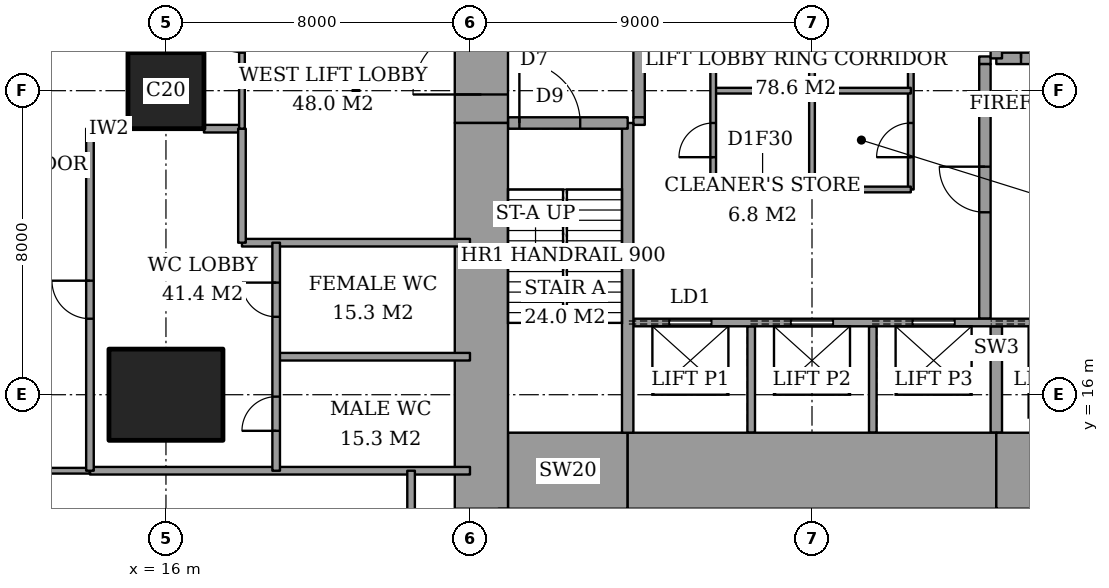
"""IFC4 building model, lengths in metres.
Left out: names, types, materials, properties, quantities, classifications, styles, units other than length and angle.
Written with IfcOpenShell. Run it as: python <this file> out.ifc"""

import sys

from ifc_helpers import new_model, si_unit, direction, frame, frame_2d, origin, origin_2d, place, context, subcontext, project, spatial, rectangle, extrude, element, fill, save


model = new_model("IFC4")
c1 = context("Model", 3, precision=1e-05, world=origin(), true_north=direction((0.0, 1.0)))
c2 = subcontext(c1, "Body", "Model", "MODEL_VIEW")
j1 = project(units=[si_unit("LENGTHUNIT", "METRE"), si_unit("PLANEANGLEUNIT", "RADIAN")], contexts=[c1])
p1 = place(None, origin())
s1 = spatial("IfcSite", under=j1, at=p1, CompositionType="ELEMENT")
p2 = place(p1, origin())
s2 = spatial("IfcBuilding", under=s1, at=p2, CompositionType="ELEMENT")
p3 = place(p2, frame((0.0, 0.0, 21.0)))
s3 = spatial("IfcBuildingStorey", under=s2, at=p3, CompositionType="ELEMENT", Elevation=21.0)
p4 = place(p3, frame((16.0, 16.0, 0.0), z_axis=(0.0, 0.0, 1.0), x_axis=(1.0, 0.0, 0.0)))
e1 = element("IfcColumn", 1, at=p4, inside=s3, PredefinedType="COLUMN", context=c2, shape_type="SweptSolid", body=[
    extrude(rectangle(XDim=3.0, YDim=2.4, at=origin_2d()), origin(), (0.0, 0.0, 1.0), 5.0),
])
p5 = place(p3, frame((16.0, 24.0, 0.0), z_axis=(0.0, 0.0, 1.0), x_axis=(1.0, 0.0, 0.0)))
e2 = element("IfcColumn", 2, at=p5, inside=s3, PredefinedType="COLUMN", context=c2, shape_type="SweptSolid", body=[
    extrude(rectangle(XDim=2.0, YDim=2.0, at=origin_2d()), origin(), (0.0, 0.0, 1.0), 5.0),
])
p6 = place(p3, frame((25.0, 14.0, 0.0), z_axis=(0.0, 0.0, 1.0), x_axis=(1.0, 0.0, 0.0)))
e3 = element("IfcWall", 3, at=p6, inside=s3, PredefinedType="SHEAR", context=c2, shape_type="SweptSolid", body=[
    extrude(rectangle(XDim=3.15, YDim=2.0, at=frame_2d((1.575, 0.0))), origin(), (0.0, 0.0, 1.0), 5.0),
])
p7 = place(p3, frame((28.15, 14.0, 0.0), z_axis=(0.0, 0.0, 1.0), x_axis=(1.0, 0.0, 0.0)))
e4 = element("IfcWall", 4, at=p7, inside=s3, PredefinedType="SHEAR", context=c2, shape_type="SweptSolid", body=[
    extrude(rectangle(XDim=9.7, YDim=2.0, at=frame_2d((4.85, 0.0))), origin(), (0.0, 0.0, 1.0), 5.0),
])
p8 = place(p3, frame((37.85, 14.0, 0.0), z_axis=(0.0, 0.0, 1.0), x_axis=(1.0, 0.0, 0.0)))
e5 = element("IfcWall", 5, at=p8, inside=s3, PredefinedType="SHEAR", context=c2, shape_type="SweptSolid", body=[
    extrude(rectangle(XDim=3.15, YDim=2.0, at=frame_2d((1.575, 0.0))), origin(), (0.0, 0.0, 1.0), 5.0),
])
p9 = place(p3, frame((24.3, 13.0, 0.0), z_axis=(0.0, 0.0, 1.0), x_axis=(0.0, 1.0, 0.0)))
e6 = element("IfcWall", 6, at=p9, inside=s3, PredefinedType="SHEAR", context=c2, shape_type="SweptSolid", body=[
    extrude(rectangle(XDim=10.15, YDim=1.4, at=frame_2d((5.075, 0.0))), origin(), (0.0, 0.0, 1.0), 5.0),
])
p10 = place(p3, frame((24.3, 23.15, 0.0), z_axis=(0.0, 0.0, 1.0), x_axis=(0.0, 1.0, 0.0)))
e7 = element("IfcWall", 7, at=p10, inside=s3, PredefinedType="SHEAR", context=c2, shape_type="SweptSolid", body=[
    extrude(rectangle(XDim=11.85, YDim=1.4, at=frame_2d((5.925, 0.0))), origin(), (0.0, 0.0, 1.0), 5.0),
])
p11 = place(p10, frame((0.75, 0.0, 0.0)))
e8 = element("IfcOpeningElement", 8, at=p11, cuts=e7, PredefinedType="OPENING", context=c2, shape_type="SweptSolid", body=[
    extrude(rectangle(XDim=1.8, YDim=2.4, at=frame_2d((0.9, 1.2))), frame((0.0, 0.71, 0.0), z_axis=(0.0, -1.0, 0.0), x_axis=(1.0, 0.0, 0.0)), (0.0, 0.0, 1.0), 1.42),
])
p12 = place(p3, frame((28.15, 15.0, 0.0), z_axis=(0.0, 0.0, 1.0), x_axis=(0.0, 1.0, 0.0)))
e9 = element("IfcWall", 9, at=p12, inside=s3, PredefinedType="SHEAR", context=c2, shape_type="SweptSolid", body=[
    extrude(rectangle(XDim=8.15, YDim=0.3, at=frame_2d((4.075, 0.0))), origin(), (0.0, 0.0, 1.0), 5.0),
])
p13 = place(p3, frame((25.0, 23.15, 0.0), z_axis=(0.0, 0.0, 1.0), x_axis=(1.0, 0.0, 0.0)))
e10 = element("IfcWall", 10, at=p13, inside=s3, PredefinedType="SHEAR", context=c2, shape_type="SweptSolid", body=[
    extrude(rectangle(XDim=3.15, YDim=0.3, at=frame_2d((1.575, 0.0))), origin(), (0.0, 0.0, 1.0), 5.0),
])
p14 = place(p13, frame((0.3, 0.0, 0.0)))
e11 = element("IfcOpeningElement", 11, at=p14, cuts=e10, PredefinedType="OPENING", context=c2, shape_type="SweptSolid", body=[
    extrude(rectangle(XDim=1.6, YDim=2.1, at=frame_2d((0.8, 1.05))), frame((0.0, 0.16, 0.0), z_axis=(0.0, -1.0, 0.0), x_axis=(1.0, 0.0, 0.0)), (0.0, 0.0, 1.0), 0.32),
])
p15 = place(p3, frame((37.85, 24.85, 0.0), z_axis=(0.0, 0.0, 1.0), x_axis=(0.0, 1.0, 0.0)))
e12 = element("IfcWall", 12, at=p15, inside=s3, PredefinedType="SHEAR", context=c2, shape_type="SweptSolid", body=[
    extrude(rectangle(XDim=8.15, YDim=0.3, at=frame_2d((4.075, 0.0))), origin(), (0.0, 0.0, 1.0), 5.0),
])
p16 = place(p3, frame((37.85, 24.85, 0.0), z_axis=(0.0, 0.0, 1.0), x_axis=(1.0, 0.0, 0.0)))
e13 = element("IfcWall", 13, at=p16, inside=s3, PredefinedType="SHEAR", context=c2, shape_type="SweptSolid", body=[
    extrude(rectangle(XDim=3.15, YDim=0.3, at=frame_2d((1.575, 0.0))), origin(), (0.0, 0.0, 1.0), 5.0),
])
p17 = place(p16, frame((0.65, 0.0, 0.0)))
e14 = element("IfcOpeningElement", 14, at=p17, cuts=e13, PredefinedType="OPENING", context=c2, shape_type="SweptSolid", body=[
    extrude(rectangle(XDim=1.6, YDim=2.1, at=frame_2d((0.8, 1.05))), frame((0.0, 0.16, 0.0), z_axis=(0.0, -1.0, 0.0), x_axis=(1.0, 0.0, 0.0)), (0.0, 0.0, 1.0), 0.32),
])
p18 = place(p3, frame((28.45, 23.3, 0.0), z_axis=(0.0, 0.0, 1.0), x_axis=(0.0, 1.0, 0.0)))
e15 = element("IfcWall", 15, at=p18, inside=s3, PredefinedType="PARTITIONING", context=c2, shape_type="SweptSolid", body=[
    extrude(rectangle(XDim=6.7, YDim=0.3, at=frame_2d((3.35, 0.0))), origin(), (0.0, 0.0, 1.0), 5.0),
])
p19 = place(p18, frame((2.7, 0.0, 0.0)))
e16 = element("IfcOpeningElement", 16, at=p19, cuts=e15, PredefinedType="OPENING", context=c2, shape_type="SweptSolid", body=[
    extrude(rectangle(XDim=1.2, YDim=2.1, at=frame_2d((0.6, 1.05))), frame((0.0, 0.16, 0.0), z_axis=(0.0, -1.0, 0.0), x_axis=(1.0, 0.0, 0.0)), (0.0, 0.0, 1.0), 0.32),
])
p20 = place(p3, frame((37.55, 18.0, 0.0), z_axis=(0.0, 0.0, 1.0), x_axis=(0.0, 1.0, 0.0)))
e17 = element("IfcWall", 17, at=p20, inside=s3, PredefinedType="PARTITIONING", context=c2, shape_type="SweptSolid", body=[
    extrude(rectangle(XDim=6.7, YDim=0.3, at=frame_2d((3.35, 0.0))), origin(), (0.0, 0.0, 1.0), 5.0),
])
p21 = place(p20, frame((2.8, 0.0, 0.0)))
e18 = element("IfcOpeningElement", 18, at=p21, cuts=e17, PredefinedType="OPENING", context=c2, shape_type="SweptSolid", body=[
    extrude(rectangle(XDim=1.2, YDim=2.1, at=frame_2d((0.6, 1.05))), frame((0.0, 0.16, 0.0), z_axis=(0.0, -1.0, 0.0), x_axis=(1.0, 0.0, 0.0)), (0.0, 0.0, 1.0), 0.32),
])
p22 = place(p3, frame((14.0, 14.0, 0.0), z_axis=(0.0, 0.0, 1.0), x_axis=(1.0, 0.0, 0.0)))
e19 = element("IfcWall", 19, at=p22, inside=s3, PredefinedType="PARTITIONING", context=c2, shape_type="SweptSolid", body=[
    extrude(rectangle(XDim=10.0, YDim=0.2, at=frame_2d((5.0, 0.0))), origin(), (0.0, 0.0, 1.0), 4.65),
])
p23 = place(p3, frame((9.5, 14.0, 0.0), z_axis=(0.0, 0.0, 1.0), x_axis=(1.0, 0.0, 0.0)))
e20 = element("IfcWall", 20, at=p23, inside=s3, PredefinedType="PARTITIONING", context=c2, shape_type="SweptSolid", body=[
    extrude(rectangle(XDim=4.5, YDim=0.15, at=frame_2d((2.25, 0.0))), origin(), (0.0, 0.0, 1.0), 4.65),
])
p24 = place(p23, frame((1.35, 0.0, 0.0)))
e21 = element("IfcOpeningElement", 21, at=p24, cuts=e20, PredefinedType="OPENING", context=c2, shape_type="SweptSolid", body=[
    extrude(rectangle(XDim=1.8, YDim=2.1, at=frame_2d((0.9, 1.05))), frame((0.0, 0.085, 0.0), z_axis=(0.0, -1.0, 0.0), x_axis=(1.0, 0.0, 0.0)), (0.0, 0.0, 1.0), 0.17),
])
p25 = place(p3, frame((18.9, 17.0, 0.0), z_axis=(0.0, 0.0, 1.0), x_axis=(1.0, 0.0, 0.0)))
e22 = element("IfcWall", 22, at=p25, inside=s3, PredefinedType="PARTITIONING", context=c2, shape_type="SweptSolid", body=[
    extrude(rectangle(XDim=5.1, YDim=0.2, at=frame_2d((2.55, 0.0))), origin(), (0.0, 0.0, 1.0), 4.65),
])
p26 = place(p3, frame((18.0, 20.0, 0.0), z_axis=(0.0, 0.0, 1.0), x_axis=(1.0, 0.0, 0.0)))
e23 = element("IfcWall", 23, at=p26, inside=s3, PredefinedType="PARTITIONING", context=c2, shape_type="SweptSolid", body=[
    extrude(rectangle(XDim=6.0, YDim=0.2, at=frame_2d((3.0, 0.0))), origin(), (0.0, 0.0, 1.0), 4.65),
])
for number, where, z_axis, x_axis in (
    (24, (14.0, 23.0, 0.0), (0.0, 0.0, 1.0), (1.0, 0.0, 0.0)),
    (25, (17.0, 23.0, 0.0), (0.0, 0.0, 1.0), (1.0, 0.0, 0.0)),
):
    element("IfcWall", number, at=place(p3, frame(where, z_axis=z_axis, x_axis=x_axis)), inside=s3, PredefinedType="PARTITIONING", context=c2, shape_type="SweptSolid", body=[
        extrude(rectangle(XDim=1.0, YDim=0.2, at=frame_2d((0.5, 0.0))), origin(), (0.0, 0.0, 1.0), 4.65),
    ])
p27 = place(p3, frame((14.0, 14.0, 0.0), z_axis=(0.0, 0.0, 1.0), x_axis=(0.0, 1.0, 0.0)))
e26 = element("IfcWall", 26, at=p27, inside=s3, PredefinedType="PARTITIONING", context=c2, shape_type="SweptSolid", body=[
    extrude(rectangle(XDim=9.0, YDim=0.2, at=frame_2d((4.5, 0.0))), origin(), (0.0, 0.0, 1.0), 4.65),
])
p28 = place(p27, frame((4.0, 0.0, 0.0)))
e27 = element("IfcOpeningElement", 27, at=p28, cuts=e26, PredefinedType="OPENING", context=c2, shape_type="SweptSolid", body=[
    extrude(rectangle(XDim=1.0, YDim=2.1, at=frame_2d((0.5, 1.05))), frame((0.0, 0.11, 0.0), z_axis=(0.0, -1.0, 0.0), x_axis=(1.0, 0.0, 0.0)), (0.0, 0.0, 1.0), 0.22),
])
p29 = place(p3, frame((18.0, 20.0, 0.0), z_axis=(0.0, 0.0, 1.0), x_axis=(0.0, 1.0, 0.0)))
e28 = element("IfcWall", 28, at=p29, inside=s3, PredefinedType="PARTITIONING", context=c2, shape_type="SweptSolid", body=[
    extrude(rectangle(XDim=3.0, YDim=0.2, at=frame_2d((1.5, 0.0))), origin(), (0.0, 0.0, 1.0), 4.65),
])
p30 = place(p3, frame((18.0, 23.0, 0.0), z_axis=(0.0, 0.0, 1.0), x_axis=(0.0, 1.0, 0.0)))
e29 = element("IfcWall", 29, at=p30, inside=s3, PredefinedType="PARTITIONING", context=c2, shape_type="SweptSolid", body=[
    extrude(rectangle(XDim=5.0, YDim=0.15, at=frame_2d((2.5, 0.0))), origin(), (0.0, 0.0, 1.0), 4.65),
])
p31 = place(p30, frame((2.0, 0.0, 0.0)))
e30 = element("IfcOpeningElement", 30, at=p31, cuts=e29, PredefinedType="OPENING", context=c2, shape_type="SweptSolid", body=[
    extrude(rectangle(XDim=1.0, YDim=2.1, at=frame_2d((0.5, 1.05))), frame((0.0, 0.085, 0.0), z_axis=(0.0, -1.0, 0.0), x_axis=(1.0, 0.0, 0.0)), (0.0, 0.0, 1.0), 0.17),
])
p32 = place(p3, frame((18.9, 14.0, 0.0), z_axis=(0.0, 0.0, 1.0), x_axis=(0.0, 1.0, 0.0)))
e31 = element("IfcWall", 31, at=p32, inside=s3, PredefinedType="PARTITIONING", context=c2, shape_type="SweptSolid", body=[
    extrude(rectangle(XDim=6.0, YDim=0.2, at=frame_2d((3.0, 0.0))), origin(), (0.0, 0.0, 1.0), 4.65),
])
p33 = place(p32, frame((1.05, 0.0, 0.0)))
e32 = element("IfcOpeningElement", 32, at=p33, cuts=e31, PredefinedType="OPENING", context=c2, shape_type="SweptSolid", body=[
    extrude(rectangle(XDim=0.9, YDim=2.1, at=frame_2d((0.45, 1.05))), frame((0.0, 0.11, 0.0), z_axis=(0.0, -1.0, 0.0), x_axis=(1.0, 0.0, 0.0)), (0.0, 0.0, 1.0), 0.22),
])
p34 = place(p32, frame((4.05, 0.0, 0.0)))
e33 = element("IfcOpeningElement", 33, at=p34, cuts=e31, PredefinedType="OPENING", context=c2, shape_type="SweptSolid", body=[
    extrude(rectangle(XDim=0.9, YDim=2.1, at=frame_2d((0.45, 1.05))), frame((0.0, 0.11, 0.0), z_axis=(0.0, -1.0, 0.0), x_axis=(1.0, 0.0, 0.0)), (0.0, 0.0, 1.0), 0.22),
])
p35 = place(p3, frame((22.45, -0.45, 0.0), z_axis=(0.0, 0.0, 1.0), x_axis=(0.0, 1.0, 0.0)))
e34 = element("IfcWall", 34, at=p35, inside=s3, PredefinedType="PARTITIONING", context=c2, shape_type="SweptSolid", body=[
    extrude(rectangle(XDim=14.45, YDim=0.2, at=frame_2d((7.225, 0.0))), origin(), (0.0, 0.0, 1.0), 4.65),
])
p36 = place(p3, frame((24.85, -0.45, 0.0), z_axis=(0.0, 0.0, 1.0), x_axis=(0.0, 1.0, 0.0)))
e35 = element("IfcWall", 35, at=p36, inside=s3, PredefinedType="PARTITIONING", context=c2, shape_type="SweptSolid", body=[
    extrude(rectangle(XDim=13.45, YDim=0.2, at=frame_2d((6.725, 0.0))), origin(), (0.0, 0.0, 1.0), 4.65),
])
p37 = place(p3, frame((28.3, 17.9, 0.0), z_axis=(0.0, 0.0, 1.0), x_axis=(1.0, 0.0, 0.0)))
e36 = element("IfcWall", 36, at=p37, inside=s3, PredefinedType="PARTITIONING", context=c2, shape_type="SweptSolid", body=[
    extrude(rectangle(XDim=12.7, YDim=0.2, at=frame_2d((6.35, 0.0))), origin(), (0.0, 0.0, 1.0), 5.0),
])
p38 = place(p37, frame((0.95, 0.0, 0.0)))
e37 = element("IfcOpeningElement", 37, at=p38, cuts=e36, PredefinedType="OPENING", context=c2, shape_type="SweptSolid", body=[
    extrude(rectangle(XDim=1.1, YDim=2.1, at=frame_2d((0.55, 1.05))), frame((0.0, 0.11, 0.0), z_axis=(0.0, -1.0, 0.0), x_axis=(1.0, 0.0, 0.0)), (0.0, 0.0, 1.0), 0.22),
])
p39 = place(p37, frame((4.15, 0.0, 0.0)))
e38 = element("IfcOpeningElement", 38, at=p39, cuts=e36, PredefinedType="OPENING", context=c2, shape_type="SweptSolid", body=[
    extrude(rectangle(XDim=1.1, YDim=2.1, at=frame_2d((0.55, 1.05))), frame((0.0, 0.11, 0.0), z_axis=(0.0, -1.0, 0.0), x_axis=(1.0, 0.0, 0.0)), (0.0, 0.0, 1.0), 0.22),
])
p40 = place(p37, frame((7.35, 0.0, 0.0)))
e39 = element("IfcOpeningElement", 39, at=p40, cuts=e36, PredefinedType="OPENING", context=c2, shape_type="SweptSolid", body=[
    extrude(rectangle(XDim=1.1, YDim=2.1, at=frame_2d((0.55, 1.05))), frame((0.0, 0.11, 0.0), z_axis=(0.0, -1.0, 0.0), x_axis=(1.0, 0.0, 0.0)), (0.0, 0.0, 1.0), 0.22),
])
p41 = place(p37, frame((10.6, 0.0, 0.0)))
e40 = element("IfcOpeningElement", 40, at=p41, cuts=e36, PredefinedType="OPENING", context=c2, shape_type="SweptSolid", body=[
    extrude(rectangle(XDim=1.2, YDim=2.1, at=frame_2d((0.6, 1.05))), frame((0.0, 0.11, 0.0), z_axis=(0.0, -1.0, 0.0), x_axis=(1.0, 0.0, 0.0)), (0.0, 0.0, 1.0), 0.22),
])
for number, where, z_axis, x_axis in (
    (41, (31.4, 15.0, 0.0), (0.0, 0.0, 1.0), (0.0, 1.0, 0.0)),
    (42, (34.6, 15.0, 0.0), (0.0, 0.0, 1.0), (0.0, 1.0, 0.0)),
):
    element("IfcWall", number, at=place(p3, frame(where, z_axis=z_axis, x_axis=x_axis)), inside=s3, PredefinedType="PARTITIONING", context=c2, shape_type="SweptSolid", body=[
        extrude(rectangle(XDim=2.8, YDim=0.2, at=frame_2d((1.4, 0.0))), origin(), (0.0, 0.0, 1.0), 5.0),
    ])
p42 = place(p3, frame((37.85, 15.0, 0.0), z_axis=(0.0, 0.0, 1.0), x_axis=(0.0, 1.0, 0.0)))
e43 = element("IfcWall", 43, at=p42, inside=s3, PredefinedType="SHEAR", context=c2, shape_type="SweptSolid", body=[
    extrude(rectangle(XDim=2.8, YDim=0.3, at=frame_2d((1.4, 0.0))), origin(), (0.0, 0.0, 1.0), 5.0),
])
for number, where, z_axis, x_axis in (
    (44, (28.3, 23.2, 0.0), (0.0, 0.0, 1.0), (1.0, 0.0, 0.0)),
    (45, (37.4, 24.8, 0.0), (0.0, 0.0, 1.0), (1.0, 0.0, 0.0)),
):
    element("IfcWall", number, at=place(p3, frame(where, z_axis=z_axis, x_axis=x_axis)), inside=s3, PredefinedType="PARTITIONING", context=c2, shape_type="SweptSolid", body=[
        extrude(rectangle(XDim=0.3, YDim=0.2, at=frame_2d((0.15, 0.0))), origin(), (0.0, 0.0, 1.0), 5.0),
    ])
p43 = place(p3, frame((30.4, 21.4, 0.0), z_axis=(0.0, 0.0, 1.0), x_axis=(1.0, 0.0, 0.0)))
e46 = element("IfcWall", 46, at=p43, inside=s3, PredefinedType="PARTITIONING", context=c2, shape_type="SweptSolid", body=[
    extrude(rectangle(XDim=5.2, YDim=0.15, at=frame_2d((2.6, 0.0))), origin(), (0.0, 0.0, 1.0), 4.65),
])
p44 = place(p3, frame((30.4, 21.4, 0.0), z_axis=(0.0, 0.0, 1.0), x_axis=(0.0, 1.0, 0.0)))
e47 = element("IfcWall", 47, at=p44, inside=s3, PredefinedType="PARTITIONING", context=c2, shape_type="SweptSolid", body=[
    extrude(rectangle(XDim=5.2, YDim=0.15, at=frame_2d((2.6, 0.0))), origin(), (0.0, 0.0, 1.0), 4.65),
])
p45 = place(p44, frame((0.85, 0.0, 0.0)))
e48 = element("IfcOpeningElement", 48, at=p45, cuts=e47, PredefinedType="OPENING", context=c2, shape_type="SweptSolid", body=[
    extrude(rectangle(XDim=0.9, YDim=2.1, at=frame_2d((0.45, 1.05))), frame((0.0, 0.085, 0.0), z_axis=(0.0, -1.0, 0.0), x_axis=(1.0, 0.0, 0.0)), (0.0, 0.0, 1.0), 0.17),
])
p46 = place(p3, frame((35.6, 21.4, 0.0), z_axis=(0.0, 0.0, 1.0), x_axis=(0.0, 1.0, 0.0)))
e49 = element("IfcWall", 49, at=p46, inside=s3, PredefinedType="PARTITIONING", context=c2, shape_type="SweptSolid", body=[
    extrude(rectangle(XDim=5.2, YDim=0.15, at=frame_2d((2.6, 0.0))), origin(), (0.0, 0.0, 1.0), 4.65),
])
p47 = place(p46, frame((0.85, 0.0, 0.0)))
e50 = element("IfcOpeningElement", 50, at=p47, cuts=e49, PredefinedType="OPENING", context=c2, shape_type="SweptSolid", body=[
    extrude(rectangle(XDim=0.9, YDim=2.1, at=frame_2d((0.45, 1.05))), frame((0.0, 0.085, 0.0), z_axis=(0.0, -1.0, 0.0), x_axis=(1.0, 0.0, 0.0)), (0.0, 0.0, 1.0), 0.17),
])
for number, where, z_axis, x_axis in (
    (51, (30.4, 24.0, 0.0), (0.0, 0.0, 1.0), (1.0, 0.0, 0.0)),
    (52, (33.0, 21.4, 0.0), (0.0, 0.0, 1.0), (0.0, 1.0, 0.0)),
):
    element("IfcWall", number, at=place(p3, frame(where, z_axis=z_axis, x_axis=x_axis)), inside=s3, PredefinedType="PARTITIONING", context=c2, shape_type="SweptSolid", body=[
        extrude(rectangle(XDim=5.2, YDim=0.15, at=frame_2d((2.6, 0.0))), origin(), (0.0, 0.0, 1.0), 4.65),
    ])
p48 = place(p28, origin())
e53 = element("IfcDoor", 53, at=p48, inside=s3, OperationType="SINGLE_SWING_LEFT", PredefinedType="DOOR", context=c2, shape_type="SweptSolid", body=[
    extrude(rectangle(XDim=1.0, YDim=2.1, at=frame_2d((0.5, 1.05))), frame((0.0, 0.025, 0.0), z_axis=(0.0, -1.0, 0.0), x_axis=(1.0, 0.0, 0.0)), (0.0, 0.0, 1.0), 0.05),
])
fill(e27, e53)
p49 = place(p33, origin())
e54 = element("IfcDoor", 54, at=p49, inside=s3, OperationType="SINGLE_SWING_RIGHT", PredefinedType="DOOR", context=c2, shape_type="SweptSolid", body=[
    extrude(rectangle(XDim=0.9, YDim=2.1, at=frame_2d((0.45, 1.05))), frame((0.0, 0.025, 0.0), z_axis=(0.0, -1.0, 0.0), x_axis=(1.0, 0.0, 0.0)), (0.0, 0.0, 1.0), 0.05),
])
fill(e32, e54)
p50 = place(p34, origin())
e55 = element("IfcDoor", 55, at=p50, inside=s3, OperationType="SINGLE_SWING_LEFT", PredefinedType="DOOR", context=c2, shape_type="SweptSolid", body=[
    extrude(rectangle(XDim=0.9, YDim=2.1, at=frame_2d((0.45, 1.05))), frame((0.0, 0.025, 0.0), z_axis=(0.0, -1.0, 0.0), x_axis=(1.0, 0.0, 0.0)), (0.0, 0.0, 1.0), 0.05),
])
fill(e33, e55)
p51 = place(p14, origin())
e56 = element("IfcDoor", 56, at=p51, inside=s3, OperationType="DOUBLE_DOOR_SINGLE_SWING", PredefinedType="DOOR", context=c2, shape_type="SweptSolid", body=[
    extrude(rectangle(XDim=1.6, YDim=2.1, at=frame_2d((0.8, 1.05))), frame((0.0, 0.025, 0.0), z_axis=(0.0, -1.0, 0.0), x_axis=(1.0, 0.0, 0.0)), (0.0, 0.0, 1.0), 0.05),
])
fill(e11, e56)
p52 = place(p17, origin())
e57 = element("IfcDoor", 57, at=p52, inside=s3, OperationType="DOUBLE_DOOR_SINGLE_SWING", PredefinedType="DOOR", context=c2, shape_type="SweptSolid", body=[
    extrude(rectangle(XDim=1.6, YDim=2.1, at=frame_2d((0.8, 1.05))), frame((0.0, 0.025, 0.0), z_axis=(0.0, -1.0, 0.0), x_axis=(1.0, 0.0, 0.0)), (0.0, 0.0, 1.0), 0.05),
])
fill(e14, e57)
p53 = place(p21, origin())
e58 = element("IfcDoor", 58, at=p53, inside=s3, OperationType="SINGLE_SWING_LEFT", PredefinedType="DOOR", context=c2, shape_type="SweptSolid", body=[
    extrude(rectangle(XDim=1.2, YDim=2.1, at=frame_2d((0.6, 1.05))), frame((0.0, 0.025, 0.0), z_axis=(0.0, -1.0, 0.0), x_axis=(1.0, 0.0, 0.0)), (0.0, 0.0, 1.0), 0.05),
])
fill(e18, e58)
p54 = place(p11, origin())
e59 = element("IfcDoor", 59, at=p54, inside=s3, OperationType="DOUBLE_DOOR_DOUBLE_SWING", PredefinedType="DOOR", context=c2, shape_type="SweptSolid", body=[
    extrude(rectangle(XDim=1.8, YDim=2.4, at=frame_2d((0.9, 1.2))), frame((0.0, 0.025, 0.0), z_axis=(0.0, -1.0, 0.0), x_axis=(1.0, 0.0, 0.0)), (0.0, 0.0, 1.0), 0.05),
])
fill(e8, e59)
p55 = place(p45, origin())
e60 = element("IfcDoor", 60, at=p55, inside=s3, OperationType="SINGLE_SWING_RIGHT", PredefinedType="DOOR", context=c2, shape_type="SweptSolid", body=[
    extrude(rectangle(XDim=0.9, YDim=2.1, at=frame_2d((0.45, 1.05))), frame((0.0, 0.025, 0.0), z_axis=(0.0, -1.0, 0.0), x_axis=(1.0, 0.0, 0.0)), (0.0, 0.0, 1.0), 0.05),
])
fill(e48, e60)
p56 = place(p47, origin())
e61 = element("IfcDoor", 61, at=p56, inside=s3, OperationType="SINGLE_SWING_RIGHT", PredefinedType="DOOR", context=c2, shape_type="SweptSolid", body=[
    extrude(rectangle(XDim=0.9, YDim=2.1, at=frame_2d((0.45, 1.05))), frame((0.0, 0.025, 0.0), z_axis=(0.0, -1.0, 0.0), x_axis=(1.0, 0.0, 0.0)), (0.0, 0.0, 1.0), 0.05),
])
fill(e50, e61)
p57 = place(p38, origin())
e62 = element("IfcDoor", 62, at=p57, inside=s3, OperationType="SLIDING_TO_LEFT", PredefinedType="DOOR", context=c2, shape_type="SweptSolid", body=[
    extrude(rectangle(XDim=1.1, YDim=2.1, at=frame_2d((0.55, 1.05))), frame((0.0, 0.025, 0.0), z_axis=(0.0, -1.0, 0.0), x_axis=(1.0, 0.0, 0.0)), (0.0, 0.0, 1.0), 0.05),
])
fill(e37, e62)
p58 = place(p39, origin())
e63 = element("IfcDoor", 63, at=p58, inside=s3, OperationType="SLIDING_TO_LEFT", PredefinedType="DOOR", context=c2, shape_type="SweptSolid", body=[
    extrude(rectangle(XDim=1.1, YDim=2.1, at=frame_2d((0.55, 1.05))), frame((0.0, 0.025, 0.0), z_axis=(0.0, -1.0, 0.0), x_axis=(1.0, 0.0, 0.0)), (0.0, 0.0, 1.0), 0.05),
])
fill(e38, e63)
p59 = place(p40, origin())
e64 = element("IfcDoor", 64, at=p59, inside=s3, OperationType="SLIDING_TO_LEFT", PredefinedType="DOOR", context=c2, shape_type="SweptSolid", body=[
    extrude(rectangle(XDim=1.1, YDim=2.1, at=frame_2d((0.55, 1.05))), frame((0.0, 0.025, 0.0), z_axis=(0.0, -1.0, 0.0), x_axis=(1.0, 0.0, 0.0)), (0.0, 0.0, 1.0), 0.05),
])
fill(e39, e64)
save(model, sys.argv[1])
